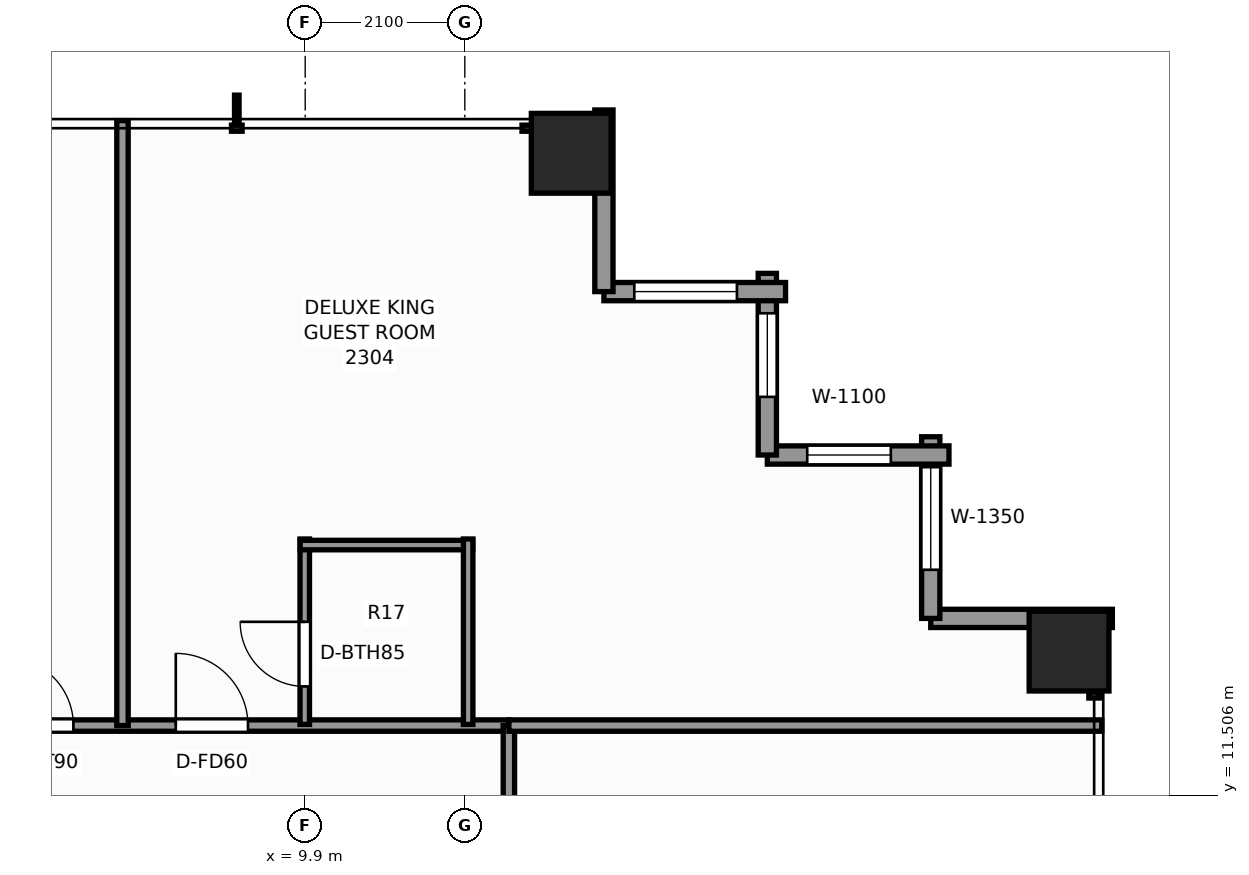
"""IFC4 building model, lengths in metres.
Left out: names, types, materials, properties, quantities, classifications, styles, units other than length and angle.
Written with IfcOpenShell. Run it as: python <this file> out.ifc"""

import sys

from ifc_helpers import new_model, si_unit, direction, frame, frame_2d, origin, origin_2d, place, context, subcontext, project, spatial, rectangle, extrude, element, fill, save


model = new_model("IFC4")
c1 = context("Model", 3, precision=1e-05, world=origin(), true_north=direction((0.0, 1.0)))
c2 = subcontext(c1, "Body", "Model", "MODEL_VIEW")
j1 = project(units=[si_unit("LENGTHUNIT", "METRE"), si_unit("PLANEANGLEUNIT", "RADIAN")], contexts=[c1])
p1 = place(None, origin())
s1 = spatial("IfcSite", under=j1, at=p1, CompositionType="ELEMENT")
p2 = place(p1, origin())
s2 = spatial("IfcBuilding", under=s1, at=p2, CompositionType="ELEMENT")
p3 = place(p2, frame((0.0, 0.0, 82.1)))
s3 = spatial("IfcBuildingStorey", under=s2, at=p3, CompositionType="ELEMENT", Elevation=82.1)
for number, where, z_axis, x_axis in (
    (1, (13.4, 19.95, 0.0), (0.0, 0.0, 1.0), (1.0, 0.0, 0.0)),
    (2, (19.95, 13.4, 0.0), (0.0, 0.0, 1.0), (1.0, 0.0, 0.0)),
):
    element("IfcColumn", number, at=place(p3, frame(where, z_axis=z_axis, x_axis=x_axis)), inside=s3, PredefinedType="COLUMN", context=c2, shape_type="SweptSolid", body=[
        extrude(rectangle(XDim=1.05, YDim=1.05, at=origin_2d()), origin(), (0.0, 0.0, 1.0), 3.3),
    ])
p4 = place(p3, frame((18.13, 13.83, 0.0), z_axis=(0.0, 0.0, 1.0), x_axis=(1.0, 0.0, 0.0)))
e3 = element("IfcWall", 3, at=p4, inside=s3, PredefinedType="STANDARD", context=c2, shape_type="SweptSolid", body=[
    extrude(rectangle(XDim=2.39, YDim=0.24, at=frame_2d((1.195, 0.0))), origin(), (0.0, 0.0, 1.0), 2.459),
])
p5 = place(p3, frame((18.13, 16.22, 0.0), z_axis=(0.0, 0.0, 1.0), x_axis=(0.0, -1.0, 0.0)))
e4 = element("IfcWall", 4, at=p5, inside=s3, PredefinedType="STANDARD", context=c2, shape_type="SweptSolid", body=[
    extrude(rectangle(XDim=2.39, YDim=0.24, at=frame_2d((1.195, 0.0))), origin(), (0.0, 0.0, 1.0), 2.459),
])
p6 = place(p5, frame((0.4, 0.0, 0.65)))
e5 = element("IfcOpeningElement", 5, at=p6, cuts=e4, PredefinedType="OPENING", context=c2, shape_type="SweptSolid", body=[
    extrude(rectangle(XDim=1.35, YDim=1.55, at=frame_2d((0.675, 0.775))), frame((0.0, 0.13, 0.0), z_axis=(0.0, -1.0, 0.0), x_axis=(1.0, 0.0, 0.0)), (0.0, 0.0, 1.0), 0.26),
])
p7 = place(p3, frame((15.98, 15.98, 0.0), z_axis=(0.0, 0.0, 1.0), x_axis=(1.0, 0.0, 0.0)))
e6 = element("IfcWall", 6, at=p7, inside=s3, PredefinedType="STANDARD", context=c2, shape_type="SweptSolid", body=[
    extrude(rectangle(XDim=2.39, YDim=0.24, at=frame_2d((1.195, 0.0))), origin(), (0.0, 0.0, 1.0), 2.459),
])
p8 = place(p7, frame((0.525, 0.0, 0.65)))
e7 = element("IfcOpeningElement", 7, at=p8, cuts=e6, PredefinedType="OPENING", context=c2, shape_type="SweptSolid", body=[
    extrude(rectangle(XDim=1.1, YDim=1.45, at=frame_2d((0.55, 0.725))), frame((0.0, 0.13, 0.0), z_axis=(0.0, -1.0, 0.0), x_axis=(1.0, 0.0, 0.0)), (0.0, 0.0, 1.0), 0.26),
])
p9 = place(p3, frame((15.98, 18.37, 0.0), z_axis=(0.0, 0.0, 1.0), x_axis=(0.0, -1.0, 0.0)))
e8 = element("IfcWall", 8, at=p9, inside=s3, PredefinedType="STANDARD", context=c2, shape_type="SweptSolid", body=[
    extrude(rectangle(XDim=2.39, YDim=0.24, at=frame_2d((1.195, 0.0))), origin(), (0.0, 0.0, 1.0), 2.459),
])
p10 = place(p9, frame((0.525, 0.0, 0.65)))
e9 = element("IfcOpeningElement", 9, at=p10, cuts=e8, PredefinedType="OPENING", context=c2, shape_type="SweptSolid", body=[
    extrude(rectangle(XDim=1.1, YDim=1.45, at=frame_2d((0.55, 0.725))), frame((0.0, 0.13, 0.0), z_axis=(0.0, -1.0, 0.0), x_axis=(1.0, 0.0, 0.0)), (0.0, 0.0, 1.0), 0.26),
])
p11 = place(p3, frame((13.83, 18.13, 0.0), z_axis=(0.0, 0.0, 1.0), x_axis=(1.0, 0.0, 0.0)))
e10 = element("IfcWall", 10, at=p11, inside=s3, PredefinedType="STANDARD", context=c2, shape_type="SweptSolid", body=[
    extrude(rectangle(XDim=2.39, YDim=0.24, at=frame_2d((1.195, 0.0))), origin(), (0.0, 0.0, 1.0), 2.459),
])
p12 = place(p11, frame((0.4, 0.0, 0.65)))
e11 = element("IfcOpeningElement", 11, at=p12, cuts=e10, PredefinedType="OPENING", context=c2, shape_type="SweptSolid", body=[
    extrude(rectangle(XDim=1.35, YDim=1.55, at=frame_2d((0.675, 0.775))), frame((0.0, 0.13, 0.0), z_axis=(0.0, -1.0, 0.0), x_axis=(1.0, 0.0, 0.0)), (0.0, 0.0, 1.0), 0.26),
])
p13 = place(p3, frame((13.83, 20.52, 0.0), z_axis=(0.0, 0.0, 1.0), x_axis=(0.0, -1.0, 0.0)))
e12 = element("IfcWall", 12, at=p13, inside=s3, PredefinedType="STANDARD", context=c2, shape_type="SweptSolid", body=[
    extrude(rectangle(XDim=2.39, YDim=0.24, at=frame_2d((1.195, 0.0))), origin(), (0.0, 0.0, 1.0), 2.459),
])
p14 = place(p3, frame((-12.58, 12.42, 0.0), z_axis=(0.0, 0.0, 1.0), x_axis=(1.0, 0.0, 0.0)))
e13 = element("IfcWall", 13, at=p14, inside=s3, PredefinedType="PARTITIONING", context=c2, shape_type="SweptSolid", body=[
    extrude(rectangle(XDim=25.16, YDim=0.15, at=frame_2d((12.58, 0.0))), origin(), (0.0, 0.0, 1.0), 2.292),
])
p15 = place(p14, frame((3.395, 0.0, 0.0)))
e14 = element("IfcOpeningElement", 14, at=p15, cuts=e13, PredefinedType="OPENING", context=c2, shape_type="SweptSolid", body=[
    extrude(rectangle(XDim=0.9, YDim=2.06, at=frame_2d((0.45, 1.03))), frame((0.0, 0.085, 0.0), z_axis=(0.0, -1.0, 0.0), x_axis=(1.0, 0.0, 0.0)), (0.0, 0.0, 1.0), 0.17),
])
p16 = place(p14, frame((5.73, 0.0, 0.0)))
e15 = element("IfcOpeningElement", 15, at=p16, cuts=e13, PredefinedType="OPENING", context=c2, shape_type="SweptSolid", body=[
    extrude(rectangle(XDim=0.9, YDim=2.06, at=frame_2d((0.45, 1.03))), frame((0.0, 0.085, 0.0), z_axis=(0.0, -1.0, 0.0), x_axis=(1.0, 0.0, 0.0)), (0.0, 0.0, 1.0), 0.17),
])
p17 = place(p14, frame((9.208, 0.0, 0.0)))
e16 = element("IfcOpeningElement", 16, at=p17, cuts=e13, PredefinedType="OPENING", context=c2, shape_type="SweptSolid", body=[
    extrude(rectangle(XDim=0.9, YDim=2.06, at=frame_2d((0.45, 1.03))), frame((0.0, 0.085, 0.0), z_axis=(0.0, -1.0, 0.0), x_axis=(1.0, 0.0, 0.0)), (0.0, 0.0, 1.0), 0.17),
])
p18 = place(p14, frame((11.208, 0.0, 0.0)))
e17 = element("IfcOpeningElement", 17, at=p18, cuts=e13, PredefinedType="OPENING", context=c2, shape_type="SweptSolid", body=[
    extrude(rectangle(XDim=0.95, YDim=2.06, at=frame_2d((0.475, 1.03))), frame((0.0, 0.085, 0.0), z_axis=(0.0, -1.0, 0.0), x_axis=(1.0, 0.0, 0.0)), (0.0, 0.0, 1.0), 0.17),
])
p19 = place(p14, frame((18.53, 0.0, 0.0)))
e18 = element("IfcOpeningElement", 18, at=p19, cuts=e13, PredefinedType="OPENING", context=c2, shape_type="SweptSolid", body=[
    extrude(rectangle(XDim=0.9, YDim=2.06, at=frame_2d((0.45, 1.03))), frame((0.0, 0.085, 0.0), z_axis=(0.0, -1.0, 0.0), x_axis=(1.0, 0.0, 0.0)), (0.0, 0.0, 1.0), 0.17),
])
p20 = place(p14, frame((20.777, 0.0, 0.0)))
e19 = element("IfcOpeningElement", 19, at=p20, cuts=e13, PredefinedType="OPENING", context=c2, shape_type="SweptSolid", body=[
    extrude(rectangle(XDim=0.95, YDim=2.06, at=frame_2d((0.475, 1.03))), frame((0.0, 0.085, 0.0), z_axis=(0.0, -1.0, 0.0), x_axis=(1.0, 0.0, 0.0)), (0.0, 0.0, 1.0), 0.17),
])
p21 = place(p3, frame((12.58, -12.42, 0.0), z_axis=(0.0, 0.0, 1.0), x_axis=(0.0, 1.0, 0.0)))
e20 = element("IfcWall", 20, at=p21, inside=s3, PredefinedType="PARTITIONING", context=c2, shape_type="SweptSolid", body=[
    extrude(rectangle(XDim=24.84, YDim=0.15, at=frame_2d((12.42, 0.0))), origin(), (0.0, 0.0, 1.0), 2.292),
])
p22 = place(p21, frame((4.41, 0.0, 0.0)))
e21 = element("IfcOpeningElement", 21, at=p22, cuts=e20, PredefinedType="OPENING", context=c2, shape_type="SweptSolid", body=[
    extrude(rectangle(XDim=0.95, YDim=2.06, at=frame_2d((0.475, 1.03))), frame((0.0, 0.085, 0.0), z_axis=(0.0, -1.0, 0.0), x_axis=(1.0, 0.0, 0.0)), (0.0, 0.0, 1.0), 0.17),
])
p23 = place(p21, frame((19.505, 0.0, 0.0)))
e22 = element("IfcOpeningElement", 22, at=p23, cuts=e20, PredefinedType="OPENING", context=c2, shape_type="SweptSolid", body=[
    extrude(rectangle(XDim=0.9, YDim=2.06, at=frame_2d((0.45, 1.03))), frame((0.0, 0.085, 0.0), z_axis=(0.0, -1.0, 0.0), x_axis=(1.0, 0.0, 0.0)), (0.0, 0.0, 1.0), 0.17),
])
p24 = place(p3, frame((12.58, 12.42, 0.0), z_axis=(0.0, 0.0, 1.0), x_axis=(1.0, 0.0, 0.0)))
e23 = element("IfcWall", 23, at=p24, inside=s3, PredefinedType="PARTITIONING", context=c2, shape_type="SweptSolid", body=[
    extrude(rectangle(XDim=7.8, YDim=0.15, at=frame_2d((3.9, 0.0))), origin(), (0.0, 0.0, 1.0), 2.292),
])
p25 = place(p3, frame((7.496, 12.42, 0.0), z_axis=(0.0, 0.0, 1.0), x_axis=(0.0, 1.0, 0.0)))
e24 = element("IfcWall", 24, at=p25, inside=s3, PredefinedType="PARTITIONING", context=c2, shape_type="SweptSolid", body=[
    extrude(rectangle(XDim=7.96, YDim=0.15, at=frame_2d((3.98, 0.0))), origin(), (0.0, 0.0, 1.0), 2.449),
])
p26 = place(p3, frame((9.894, 12.435, 0.0), z_axis=(0.0, 0.0, 1.0), x_axis=(0.0, 1.0, 0.0)))
e25 = element("IfcWall", 25, at=p26, inside=s3, PredefinedType="PARTITIONING", context=c2, shape_type="SweptSolid", body=[
    extrude(rectangle(XDim=2.44, YDim=0.125, at=frame_2d((1.22, 0.0))), origin(), (0.0, 0.0, 1.0), 3.08),
])
p27 = place(p26, frame((0.5, 0.0, 0.0)))
e26 = element("IfcOpeningElement", 26, at=p27, cuts=e25, PredefinedType="OPENING", context=c2, shape_type="SweptSolid", body=[
    extrude(rectangle(XDim=0.85, YDim=2.03, at=frame_2d((0.425, 1.015))), frame((0.0, 0.073, 0.0), z_axis=(0.0, -1.0, 0.0), x_axis=(1.0, 0.0, 0.0)), (0.0, 0.0, 1.0), 0.145),
])
p28 = place(p3, frame((9.834, 14.795, 0.0), z_axis=(0.0, 0.0, 1.0), x_axis=(1.0, 0.0, 0.0)))
e27 = element("IfcWall", 27, at=p28, inside=s3, PredefinedType="PARTITIONING", context=c2, shape_type="SweptSolid", body=[
    extrude(rectangle(XDim=2.27, YDim=0.125, at=frame_2d((1.135, 0.0))), origin(), (0.0, 0.0, 1.0), 2.292),
])
p29 = place(p3, frame((12.044, 12.435, 0.0), z_axis=(0.0, 0.0, 1.0), x_axis=(0.0, 1.0, 0.0)))
e28 = element("IfcWall", 28, at=p29, inside=s3, PredefinedType="PARTITIONING", context=c2, shape_type="SweptSolid", body=[
    extrude(rectangle(XDim=2.44, YDim=0.125, at=frame_2d((1.22, 0.0))), origin(), (0.0, 0.0, 1.0), 3.08),
])
p30 = place(p6, origin())
e29 = element("IfcWindow", 29, at=p30, inside=s3, PartitioningType="SINGLE_PANEL", PredefinedType="WINDOW", context=c2, shape_type="SweptSolid", body=[
    extrude(rectangle(XDim=1.35, YDim=1.55, at=frame_2d((0.675, 0.775))), frame((0.0, 0.03, 0.0), z_axis=(0.0, -1.0, 0.0), x_axis=(1.0, 0.0, 0.0)), (0.0, 0.0, 1.0), 0.06),
])
fill(e5, e29)
p31 = place(p8, origin())
e30 = element("IfcWindow", 30, at=p31, inside=s3, PartitioningType="SINGLE_PANEL", PredefinedType="WINDOW", context=c2, shape_type="SweptSolid", body=[
    extrude(rectangle(XDim=1.1, YDim=1.45, at=frame_2d((0.55, 0.725))), frame((0.0, 0.03, 0.0), z_axis=(0.0, -1.0, 0.0), x_axis=(1.0, 0.0, 0.0)), (0.0, 0.0, 1.0), 0.06),
])
fill(e7, e30)
p32 = place(p10, origin())
e31 = element("IfcWindow", 31, at=p32, inside=s3, PartitioningType="SINGLE_PANEL", PredefinedType="WINDOW", context=c2, shape_type="SweptSolid", body=[
    extrude(rectangle(XDim=1.1, YDim=1.45, at=frame_2d((0.55, 0.725))), frame((0.0, 0.03, 0.0), z_axis=(0.0, -1.0, 0.0), x_axis=(1.0, 0.0, 0.0)), (0.0, 0.0, 1.0), 0.06),
])
fill(e9, e31)
p33 = place(p12, origin())
e32 = element("IfcWindow", 32, at=p33, inside=s3, PartitioningType="SINGLE_PANEL", PredefinedType="WINDOW", context=c2, shape_type="SweptSolid", body=[
    extrude(rectangle(XDim=1.35, YDim=1.55, at=frame_2d((0.675, 0.775))), frame((0.0, 0.03, 0.0), z_axis=(0.0, -1.0, 0.0), x_axis=(1.0, 0.0, 0.0)), (0.0, 0.0, 1.0), 0.06),
])
fill(e11, e32)
p34 = place(p19, origin())
e33 = element("IfcDoor", 33, at=p34, inside=s3, OperationType="SINGLE_SWING_LEFT", PredefinedType="DOOR", context=c2, shape_type="SweptSolid", body=[
    extrude(rectangle(XDim=0.9, YDim=2.06, at=frame_2d((0.45, 1.03))), frame((0.0, 0.025, 0.0), z_axis=(0.0, -1.0, 0.0), x_axis=(1.0, 0.0, 0.0)), (0.0, 0.0, 1.0), 0.05),
])
fill(e18, e33)
p35 = place(p27, origin())
e34 = element("IfcDoor", 34, at=p35, inside=s3, OperationType="SINGLE_SWING_RIGHT", PredefinedType="DOOR", context=c2, shape_type="SweptSolid", body=[
    extrude(rectangle(XDim=0.85, YDim=2.03, at=frame_2d((0.425, 1.015))), frame((0.0, 0.025, 0.0), z_axis=(0.0, -1.0, 0.0), x_axis=(1.0, 0.0, 0.0)), (0.0, 0.0, 1.0), 0.05),
])
fill(e26, e34)
p36 = place(p20, origin())
e35 = element("IfcDoor", 35, at=p36, inside=s3, OperationType="SINGLE_SWING_LEFT", PredefinedType="DOOR", context=c2, shape_type="SweptSolid", body=[
    extrude(rectangle(XDim=0.95, YDim=2.06, at=frame_2d((0.475, 1.03))), frame((0.0, 0.025, 0.0), z_axis=(0.0, -1.0, 0.0), x_axis=(1.0, 0.0, 0.0)), (0.0, 0.0, 1.0), 0.05),
])
fill(e19, e35)
save(model, sys.argv[1])
